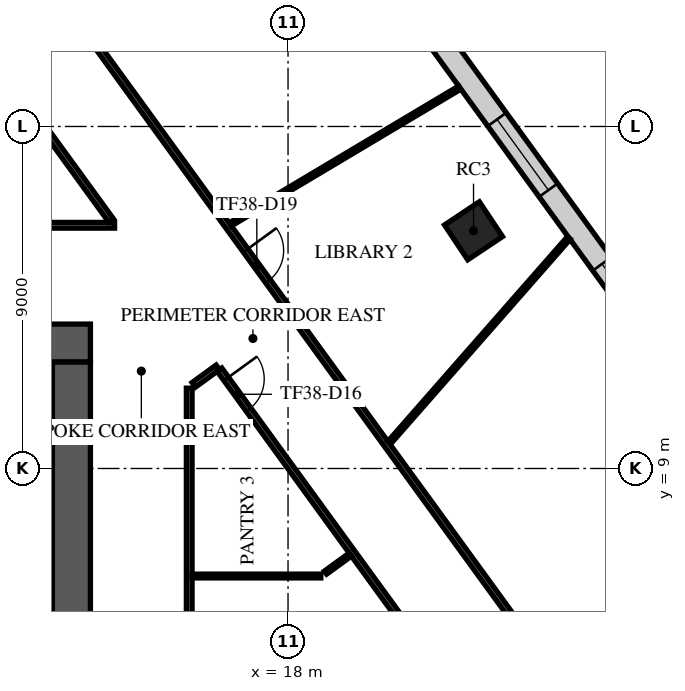
"""IFC4 building model, lengths in metres.
Left out: names, types, materials, properties, quantities, classifications, styles, units other than length and angle.
Written with IfcOpenShell. Run it as: python <this file> out.ifc"""

import sys

from ifc_helpers import new_model, si_unit, direction, frame, frame_2d, origin, origin_2d, place, context, subcontext, project, spatial, rectangle, extrude, element, fill, save


model = new_model("IFC4")
c1 = context("Model", 3, precision=1e-05, world=origin(), true_north=direction((0.0, 1.0)))
c2 = subcontext(c1, "Body", "Model", "MODEL_VIEW")
j1 = project(units=[si_unit("LENGTHUNIT", "METRE"), si_unit("PLANEANGLEUNIT", "RADIAN")], contexts=[c1])
p1 = place(None, origin())
s1 = spatial("IfcSite", under=j1, at=p1, CompositionType="ELEMENT")
p2 = place(p1, origin())
s2 = spatial("IfcBuilding", under=s1, at=p2, CompositionType="ELEMENT")
p3 = place(p2, frame((0.0, 0.0, 163.7)))
s3 = spatial("IfcBuildingStorey", under=s2, at=p3, CompositionType="ELEMENT", Elevation=163.7)
p4 = place(p3, frame((22.881, 15.255, 0.0), z_axis=(0.0, 0.0, 1.0), x_axis=(0.832028680356, 0.55473261583, 0.0)))
e1 = element("IfcColumn", 1, at=p4, inside=s3, PredefinedType="COLUMN", context=c2, shape_type="SweptSolid", body=[
    extrude(rectangle(XDim=1.1, YDim=1.1, at=origin_2d()), origin(), (0.0, 0.0, 1.0), 4.0),
])
p5 = place(p3, frame((-12.8, 12.3, 0.0), z_axis=(0.0, 0.0, 1.0), x_axis=(1.0, 0.0, 0.0)))
e2 = element("IfcWall", 2, at=p5, inside=s3, PredefinedType="SHEAR", context=c2, shape_type="SweptSolid", body=[
    extrude(rectangle(XDim=25.6, YDim=1.0, at=frame_2d((12.8, 0.0))), origin(), (0.0, 0.0, 1.0), 3.6),
])
p6 = place(p5, frame((11.6, 0.0, 0.0)))
e3 = element("IfcOpeningElement", 3, at=p6, cuts=e2, PredefinedType="OPENING", context=c2, shape_type="SweptSolid", body=[
    extrude(rectangle(XDim=2.4, YDim=2.4, at=frame_2d((1.2, 1.2))), frame((0.0, 0.51, 0.0), z_axis=(0.0, -1.0, 0.0), x_axis=(1.0, 0.0, 0.0)), (0.0, 0.0, 1.0), 1.02),
])
p7 = place(p5, frame((22.425, 0.0, 0.0)))
e4 = element("IfcOpeningElement", 4, at=p7, cuts=e2, PredefinedType="OPENING", context=c2, shape_type="SweptSolid", body=[
    extrude(rectangle(XDim=1.2, YDim=2.1, at=frame_2d((0.6, 1.05))), frame((0.0, 0.51, 0.0), z_axis=(0.0, -1.0, 0.0), x_axis=(1.0, 0.0, 0.0)), (0.0, 0.0, 1.0), 1.02),
])
p8 = place(p5, frame((1.4, 0.0, 0.0)))
e5 = element("IfcOpeningElement", 5, at=p8, cuts=e2, PredefinedType="OPENING", context=c2, shape_type="SweptSolid", body=[
    extrude(rectangle(XDim=1.0, YDim=2.1, at=frame_2d((0.5, 1.05))), frame((0.0, 0.51, 0.0), z_axis=(0.0, -1.0, 0.0), x_axis=(1.0, 0.0, 0.0)), (0.0, 0.0, 1.0), 1.02),
])
p9 = place(p3, frame((12.3, -11.8, 0.0), z_axis=(0.0, 0.0, 1.0), x_axis=(0.0, 1.0, 0.0)))
e6 = element("IfcWall", 6, at=p9, inside=s3, PredefinedType="SHEAR", context=c2, shape_type="SweptSolid", body=[
    extrude(rectangle(XDim=23.6, YDim=1.0, at=frame_2d((11.8, 0.0))), origin(), (0.0, 0.0, 1.0), 3.6),
])
p10 = place(p9, frame((10.6, 0.0, 0.0)))
e7 = element("IfcOpeningElement", 7, at=p10, cuts=e6, PredefinedType="OPENING", context=c2, shape_type="SweptSolid", body=[
    extrude(rectangle(XDim=2.4, YDim=2.4, at=frame_2d((1.2, 1.2))), frame((0.0, 0.51, 0.0), z_axis=(0.0, -1.0, 0.0), x_axis=(1.0, 0.0, 0.0)), (0.0, 0.0, 1.0), 1.02),
])
p11 = place(p3, frame((36.533, 0.245, 0.0), z_axis=(0.0, 0.0, 1.0), x_axis=(-0.58778579343, 0.809016601215, 0.0)))
e8 = element("IfcWall", 8, at=p11, inside=s3, PredefinedType="STANDARD", context=c2, shape_type="SweptSolid", body=[
    extrude(rectangle(XDim=42.176, YDim=0.6, at=frame_2d((21.088, 0.0))), origin(), (0.0, 0.0, 1.0), 3.6),
])
p12 = place(p11, frame((1.138, 0.0, 0.9)))
e9 = element("IfcOpeningElement", 9, at=p12, cuts=e8, PredefinedType="OPENING", context=c2, shape_type="SweptSolid", body=[
    extrude(rectangle(XDim=2.3, YDim=2.1, at=frame_2d((1.15, 1.05))), frame((0.0, 0.31, 0.0), z_axis=(0.0, -1.0, 0.0), x_axis=(1.0, 0.0, 0.0)), (0.0, 0.0, 1.0), 0.62),
])
p13 = place(p11, frame((5.776, 0.0, 0.9)))
e10 = element("IfcOpeningElement", 10, at=p13, cuts=e8, PredefinedType="OPENING", context=c2, shape_type="SweptSolid", body=[
    extrude(rectangle(XDim=2.3, YDim=2.1, at=frame_2d((1.15, 1.05))), frame((0.0, 0.31, 0.0), z_axis=(0.0, -1.0, 0.0), x_axis=(1.0, 0.0, 0.0)), (0.0, 0.0, 1.0), 0.62),
])
p14 = place(p11, frame((10.476, 0.0, 0.9)))
e11 = element("IfcOpeningElement", 11, at=p14, cuts=e8, PredefinedType="OPENING", context=c2, shape_type="SweptSolid", body=[
    extrude(rectangle(XDim=2.3, YDim=2.1, at=frame_2d((1.15, 1.05))), frame((0.0, 0.31, 0.0), z_axis=(0.0, -1.0, 0.0), x_axis=(1.0, 0.0, 0.0)), (0.0, 0.0, 1.0), 0.62),
])
p15 = place(p11, frame((15.176, 0.0, 0.9)))
e12 = element("IfcOpeningElement", 12, at=p15, cuts=e8, PredefinedType="OPENING", context=c2, shape_type="SweptSolid", body=[
    extrude(rectangle(XDim=2.3, YDim=2.1, at=frame_2d((1.15, 1.05))), frame((0.0, 0.31, 0.0), z_axis=(0.0, -1.0, 0.0), x_axis=(1.0, 0.0, 0.0)), (0.0, 0.0, 1.0), 0.62),
])
p16 = place(p11, frame((19.876, 0.0, 0.9)))
e13 = element("IfcOpeningElement", 13, at=p16, cuts=e8, PredefinedType="OPENING", context=c2, shape_type="SweptSolid", body=[
    extrude(rectangle(XDim=2.3, YDim=2.1, at=frame_2d((1.15, 1.05))), frame((0.0, 0.31, 0.0), z_axis=(0.0, -1.0, 0.0), x_axis=(1.0, 0.0, 0.0)), (0.0, 0.0, 1.0), 0.62),
])
p17 = place(p11, frame((24.576, 0.0, 0.9)))
e14 = element("IfcOpeningElement", 14, at=p17, cuts=e8, PredefinedType="OPENING", context=c2, shape_type="SweptSolid", body=[
    extrude(rectangle(XDim=2.3, YDim=2.1, at=frame_2d((1.15, 1.05))), frame((0.0, 0.31, 0.0), z_axis=(0.0, -1.0, 0.0), x_axis=(1.0, 0.0, 0.0)), (0.0, 0.0, 1.0), 0.62),
])
p18 = place(p11, frame((29.276, 0.0, 0.9)))
e15 = element("IfcOpeningElement", 15, at=p18, cuts=e8, PredefinedType="OPENING", context=c2, shape_type="SweptSolid", body=[
    extrude(rectangle(XDim=2.3, YDim=2.1, at=frame_2d((1.15, 1.05))), frame((0.0, 0.31, 0.0), z_axis=(0.0, -1.0, 0.0), x_axis=(1.0, 0.0, 0.0)), (0.0, 0.0, 1.0), 0.62),
])
p19 = place(p11, frame((33.976, 0.0, 0.9)))
e16 = element("IfcOpeningElement", 16, at=p19, cuts=e8, PredefinedType="OPENING", context=c2, shape_type="SweptSolid", body=[
    extrude(rectangle(XDim=2.3, YDim=2.1, at=frame_2d((1.15, 1.05))), frame((0.0, 0.31, 0.0), z_axis=(0.0, -1.0, 0.0), x_axis=(1.0, 0.0, 0.0)), (0.0, 0.0, 1.0), 0.62),
])
p20 = place(p11, frame((38.676, 0.0, 0.9)))
e17 = element("IfcOpeningElement", 17, at=p20, cuts=e8, PredefinedType="OPENING", context=c2, shape_type="SweptSolid", body=[
    extrude(rectangle(XDim=2.3, YDim=2.1, at=frame_2d((1.15, 1.05))), frame((0.0, 0.31, 0.0), z_axis=(0.0, -1.0, 0.0), x_axis=(1.0, 0.0, 0.0)), (0.0, 0.0, 1.0), 0.62),
])
p21 = place(p3, frame((-7.422, 15.4, 0.0), z_axis=(0.0, 0.0, 1.0), x_axis=(1.0, 0.0, 0.0)))
e18 = element("IfcWall", 18, at=p21, inside=s3, PredefinedType="PARTITIONING", context=c2, shape_type="SweptSolid", body=[
    extrude(rectangle(XDim=20.858, YDim=0.15, at=frame_2d((10.429, 0.0))), origin(), (0.0, 0.0, 1.0), 3.15),
])
p22 = place(p21, frame((12.542, 0.0, 0.0)))
e19 = element("IfcOpeningElement", 19, at=p22, cuts=e18, PredefinedType="OPENING", context=c2, shape_type="SweptSolid", body=[
    extrude(rectangle(XDim=1.0, YDim=2.1, at=frame_2d((0.5, 1.05))), frame((0.0, 0.085, 0.0), z_axis=(0.0, -1.0, 0.0), x_axis=(1.0, 0.0, 0.0)), (0.0, 0.0, 1.0), 0.17),
])
p23 = place(p3, frame((7.739, 23.241, 0.0), z_axis=(0.0, 0.0, 1.0), x_axis=(0.587792950245, -0.809011401429, 0.0)))
e20 = element("IfcWall", 20, at=p23, inside=s3, PredefinedType="PARTITIONING", context=c2, shape_type="SweptSolid", body=[
    extrude(rectangle(XDim=9.545, YDim=0.15, at=frame_2d((4.772, 0.0))), origin(), (0.0, 0.0, 1.0), 3.15),
])
p24 = place(p3, frame((9.681, 24.652, 0.0), z_axis=(0.0, 0.0, 1.0), x_axis=(0.58776328895, -0.809032951222, 0.0)))
e21 = element("IfcWall", 21, at=p24, inside=s3, PredefinedType="PARTITIONING", context=c2, shape_type="SweptSolid", body=[
    extrude(rectangle(XDim=28.583, YDim=0.15, at=frame_2d((14.291, 0.0))), origin(), (0.0, 0.0, 1.0), 3.15),
])
p25 = place(p24, frame((12.256, 0.0, 0.0)))
e22 = element("IfcOpeningElement", 22, at=p25, cuts=e21, PredefinedType="OPENING", context=c2, shape_type="SweptSolid", body=[
    extrude(rectangle(XDim=1.0, YDim=2.1, at=frame_2d((0.5, 1.05))), frame((0.0, 0.085, 0.0), z_axis=(0.0, -1.0, 0.0), x_axis=(1.0, 0.0, 0.0)), (0.0, 0.0, 1.0), 0.17),
])
p26 = place(p3, frame((15.4, -9.457, 0.0), z_axis=(0.0, 0.0, 1.0), x_axis=(0.0, 1.0, 0.0)))
e23 = element("IfcWall", 23, at=p26, inside=s3, PredefinedType="PARTITIONING", context=c2, shape_type="SweptSolid", body=[
    extrude(rectangle(XDim=20.571, YDim=0.15, at=frame_2d((10.285, 0.0))), origin(), (0.0, 0.0, 1.0), 3.15),
])
p27 = place(p26, frame((3.55, 0.0, 0.0)))
e24 = element("IfcOpeningElement", 24, at=p27, cuts=e23, PredefinedType="OPENING", context=c2, shape_type="SweptSolid", body=[
    extrude(rectangle(XDim=1.0, YDim=2.1, at=frame_2d((0.5, 1.05))), frame((0.0, 0.085, 0.0), z_axis=(0.0, -1.0, 0.0), x_axis=(1.0, 0.0, 0.0)), (0.0, 0.0, 1.0), 0.17),
])
p28 = place(p26, frame((7.853, 0.0, 0.0)))
e25 = element("IfcOpeningElement", 25, at=p28, cuts=e23, PredefinedType="OPENING", context=c2, shape_type="SweptSolid", body=[
    extrude(rectangle(XDim=1.8, YDim=2.1, at=frame_2d((0.9, 1.05))), frame((0.0, 0.085, 0.0), z_axis=(0.0, -1.0, 0.0), x_axis=(1.0, 0.0, 0.0)), (0.0, 0.0, 1.0), 0.17),
])
p29 = place(p3, frame((15.519, 11.2, 0.0), z_axis=(0.0, 0.0, 1.0), x_axis=(0.809140088661, 0.587615790225, 0.0)))
e26 = element("IfcWall", 26, at=p29, inside=s3, PredefinedType="PARTITIONING", context=c2, shape_type="SweptSolid", body=[
    extrude(rectangle(XDim=0.784, YDim=0.15, at=frame_2d((0.392, 0.0))), origin(), (0.0, 0.0, 1.0), 3.6),
])
p30 = place(p3, frame((16.197, 11.6, 0.0), z_axis=(0.0, 0.0, 1.0), x_axis=(0.587765569966, -0.809031294057, 0.0)))
e27 = element("IfcWall", 27, at=p30, inside=s3, PredefinedType="PARTITIONING", context=c2, shape_type="SweptSolid", body=[
    extrude(rectangle(XDim=14.193, YDim=0.15, at=frame_2d((7.096, 0.0))), origin(), (0.0, 0.0, 1.0), 3.15),
])
p31 = place(p30, frame((0.3, 0.0, 0.0)))
e28 = element("IfcOpeningElement", 28, at=p31, cuts=e27, PredefinedType="OPENING", context=c2, shape_type="SweptSolid", body=[
    extrude(rectangle(XDim=1.0, YDim=2.1, at=frame_2d((0.5, 1.05))), frame((0.0, 0.085, 0.0), z_axis=(0.0, -1.0, 0.0), x_axis=(1.0, 0.0, 0.0)), (0.0, 0.0, 1.0), 0.17),
])
p32 = place(p30, frame((11.26, 0.0, 0.0)))
e29 = element("IfcOpeningElement", 29, at=p32, cuts=e27, PredefinedType="OPENING", context=c2, shape_type="SweptSolid", body=[
    extrude(rectangle(XDim=1.0, YDim=2.1, at=frame_2d((0.5, 1.05))), frame((0.0, 0.085, 0.0), z_axis=(0.0, -1.0, 0.0), x_axis=(1.0, 0.0, 0.0)), (0.0, 0.0, 1.0), 0.17),
])
p33 = place(p3, frame((15.475, 6.17, 0.0), z_axis=(0.0, 0.0, 1.0), x_axis=(1.0, 0.0, 0.0)))
e30 = element("IfcWall", 30, at=p33, inside=s3, PredefinedType="PARTITIONING", context=c2, shape_type="SweptSolid", body=[
    extrude(rectangle(XDim=3.387, YDim=0.1, at=frame_2d((1.693, 0.0))), origin(), (0.0, 0.0, 1.0), 3.6),
])
p34 = place(p3, frame((16.483, 15.425, 0.0), z_axis=(0.0, 0.0, 1.0), x_axis=(0.858967254215, 0.51203052271, 0.0)))
e31 = element("IfcWall", 31, at=p34, inside=s3, PredefinedType="PARTITIONING", context=c2, shape_type="SweptSolid", body=[
    extrude(rectangle(XDim=7.026, YDim=0.1, at=frame_2d((3.513, 0.0))), origin(), (0.0, 0.0, 1.0), 2.9),
])
p35 = place(p3, frame((18.987, 6.26, 0.0), z_axis=(0.0, 0.0, 1.0), x_axis=(0.80898458322, 0.587829859834, 0.0)))
e32 = element("IfcWall", 32, at=p35, inside=s3, PredefinedType="PARTITIONING", context=c2, shape_type="SweptSolid", body=[
    extrude(rectangle(XDim=0.807, YDim=0.1, at=frame_2d((0.403, 0.0))), origin(), (0.0, 0.0, 1.0), 3.6),
])
p36 = place(p3, frame((20.664, 9.68, 0.0), z_axis=(0.0, 0.0, 1.0), x_axis=(0.659403704838, 0.751789035598, 0.0)))
e33 = element("IfcWall", 33, at=p36, inside=s3, PredefinedType="PARTITIONING", context=c2, shape_type="SweptSolid", body=[
    extrude(rectangle(XDim=7.167, YDim=0.1, at=frame_2d((3.583, 0.0))), origin(), (0.0, 0.0, 1.0), 2.9),
])
p37 = place(p15, origin())
e34 = element("IfcWindow", 34, at=p37, inside=s3, PartitioningType="SINGLE_PANEL", PredefinedType="WINDOW", context=c2, shape_type="SweptSolid", body=[
    extrude(rectangle(XDim=2.3, YDim=2.1, at=frame_2d((1.15, 1.05))), frame((0.0, 0.03, 0.0), z_axis=(0.0, -1.0, 0.0), x_axis=(1.0, 0.0, 0.0)), (0.0, 0.0, 1.0), 0.06),
])
fill(e12, e34)
p38 = place(p16, origin())
e35 = element("IfcWindow", 35, at=p38, inside=s3, PartitioningType="SINGLE_PANEL", PredefinedType="WINDOW", context=c2, shape_type="SweptSolid", body=[
    extrude(rectangle(XDim=2.3, YDim=2.1, at=frame_2d((1.15, 1.05))), frame((0.0, 0.03, 0.0), z_axis=(0.0, -1.0, 0.0), x_axis=(1.0, 0.0, 0.0)), (0.0, 0.0, 1.0), 0.06),
])
fill(e13, e35)
p39 = place(p31, frame((1.0, 0.0, 0.0), z_axis=(0.0, 0.0, 1.0), x_axis=(-1.0, 0.0, 0.0)))
e36 = element("IfcDoor", 36, at=p39, inside=s3, OperationType="SINGLE_SWING_LEFT", PredefinedType="DOOR", context=c2, shape_type="SweptSolid", body=[
    extrude(rectangle(XDim=1.0, YDim=2.1, at=frame_2d((0.5, 1.05))), frame((0.0, 0.025, 0.0), z_axis=(0.0, -1.0, 0.0), x_axis=(1.0, 0.0, 0.0)), (0.0, 0.0, 1.0), 0.05),
])
fill(e28, e36)
p40 = place(p25, origin())
e37 = element("IfcDoor", 37, at=p40, inside=s3, OperationType="SINGLE_SWING_RIGHT", PredefinedType="DOOR", context=c2, shape_type="SweptSolid", body=[
    extrude(rectangle(XDim=1.0, YDim=2.1, at=frame_2d((0.5, 1.05))), frame((0.0, 0.025, 0.0), z_axis=(0.0, -1.0, 0.0), x_axis=(1.0, 0.0, 0.0)), (0.0, 0.0, 1.0), 0.05),
])
fill(e22, e37)
save(model, sys.argv[1])
